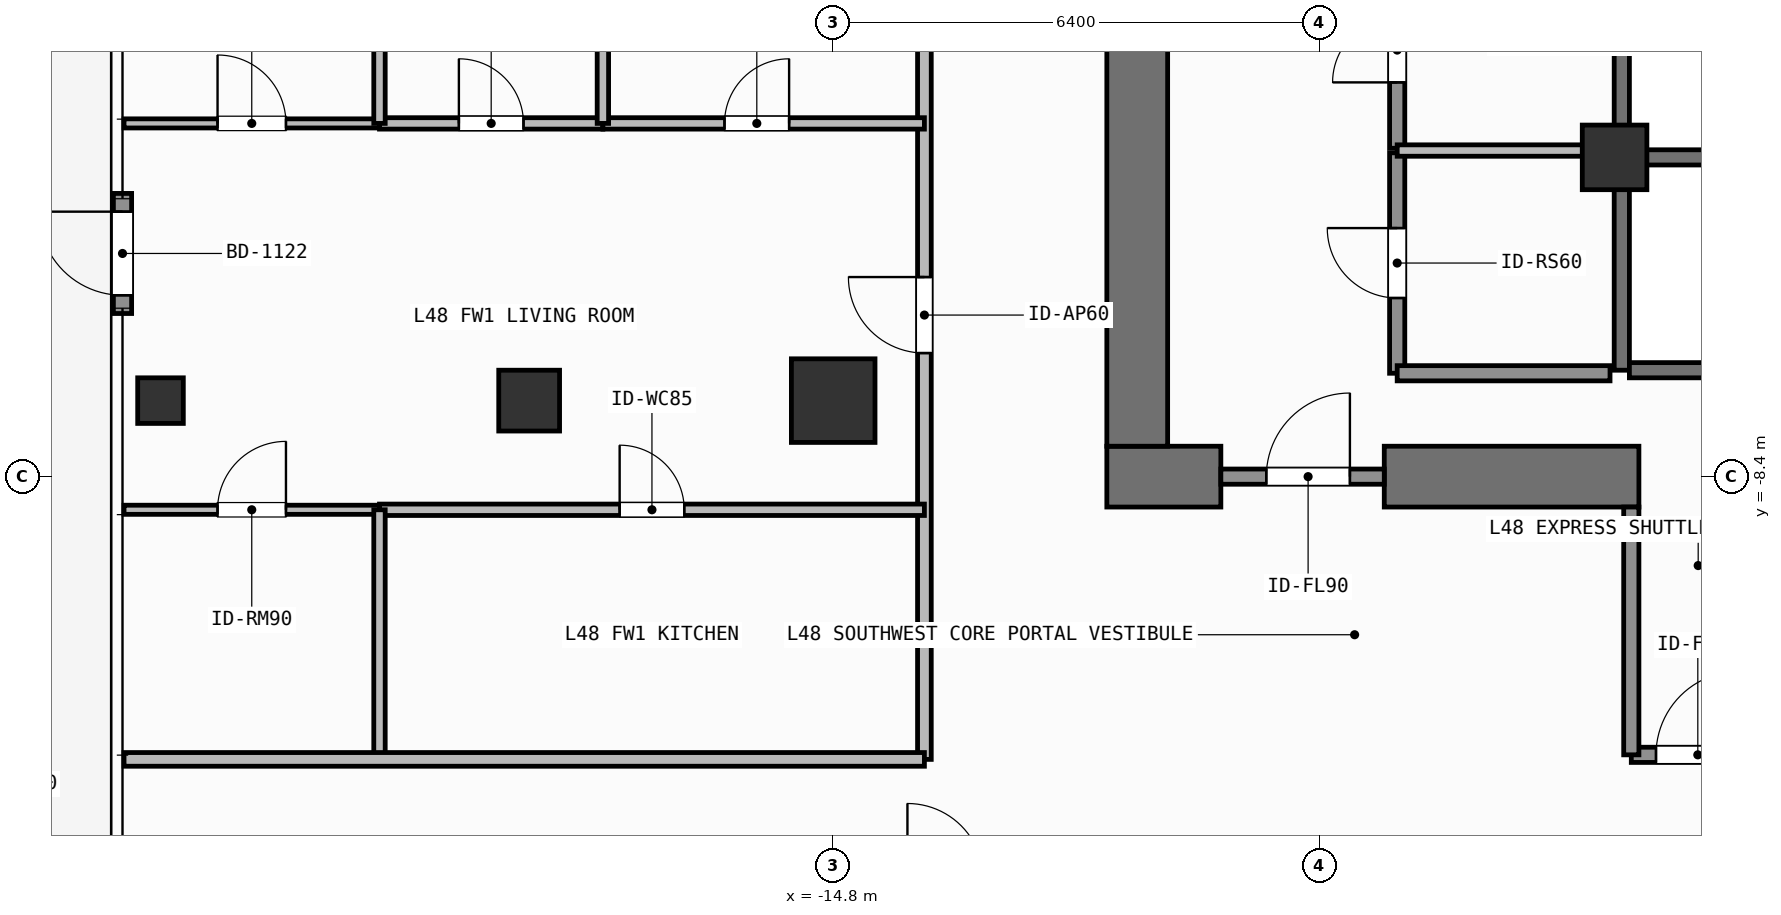
"""IFC4 building model, lengths in metres.
Left out: names, types, materials, properties, quantities, classifications, styles, units other than length and angle.
Written with IfcOpenShell. Run it as: python <this file> out.ifc"""

import sys

from ifc_helpers import new_model, si_unit, direction, frame, frame_2d, origin, origin_2d, place, context, subcontext, project, spatial, rectangle, hollow_rectangle, extrude, element, fill, save


model = new_model("IFC4")
c1 = context("Model", 3, precision=1e-05, world=origin(), true_north=direction((0.0, 1.0)))
c2 = subcontext(c1, "Body", "Model", "MODEL_VIEW")
j1 = project(units=[si_unit("LENGTHUNIT", "METRE"), si_unit("PLANEANGLEUNIT", "RADIAN")], contexts=[c1])
p1 = place(None, origin())
s1 = spatial("IfcSite", under=j1, at=p1, CompositionType="ELEMENT")
p2 = place(p1, origin())
s2 = spatial("IfcBuilding", under=s1, at=p2, CompositionType="ELEMENT")
p3 = place(p2, frame((0.0, 0.0, 195.3)))
s3 = spatial("IfcBuildingStorey", under=s2, at=p3, CompositionType="ELEMENT", Elevation=195.3)
p4 = place(p3, frame((-11.2, -8.4, 0.0), z_axis=(0.0, 0.0, 1.0), x_axis=(1.0, 0.0, 0.0)))
e1 = element("IfcWall", 1, at=p4, inside=s3, PredefinedType="SHEAR", context=c2, shape_type="SweptSolid", body=[
    extrude(rectangle(XDim=1.5, YDim=0.8, at=frame_2d((0.75, 0.0))), origin(), (0.0, 0.0, 1.0), 3.9),
])
p5 = place(p3, frame((-7.55, -8.4, 0.0), z_axis=(0.0, 0.0, 1.0), x_axis=(1.0, 0.0, 0.0)))
e2 = element("IfcWall", 2, at=p5, inside=s3, PredefinedType="SHEAR", context=c2, shape_type="SweptSolid", body=[
    extrude(rectangle(XDim=3.35, YDim=0.8, at=frame_2d((1.675, 0.0))), origin(), (0.0, 0.0, 1.0), 3.9),
])
p6 = place(p3, frame((-10.8, -8.0, 0.0), z_axis=(0.0, 0.0, 1.0), x_axis=(0.0, 1.0, 0.0)))
e3 = element("IfcWall", 3, at=p6, inside=s3, PredefinedType="SHEAR", context=c2, shape_type="SweptSolid", body=[
    extrude(rectangle(XDim=16.0, YDim=0.8, at=frame_2d((8.0, 0.0))), origin(), (0.0, 0.0, 1.0), 3.9),
])
p7 = place(p3, frame((-14.8, -7.4, 0.0), z_axis=(0.0, 0.0, 1.0), x_axis=(1.0, 0.0, 0.0)))
e4 = element("IfcColumn", 4, at=p7, inside=s3, PredefinedType="COLUMN", context=c2, shape_type="SweptSolid", body=[
    extrude(rectangle(XDim=1.1, YDim=1.1, at=origin_2d()), origin(), (0.0, 0.0, 1.0), 3.9),
])
p8 = place(p3, frame((-4.52, -4.2, 0.0), z_axis=(0.0, 0.0, 1.0), x_axis=(1.0, 0.0, 0.0)))
e5 = element("IfcColumn", 5, at=p8, inside=s3, PredefinedType="COLUMN", context=c2, shape_type="SweptSolid", body=[
    extrude(rectangle(XDim=0.85, YDim=0.85, at=origin_2d()), origin(), (0.0, 0.0, 1.0), 3.9),
])
p9 = place(p3, frame((-18.8, -7.4, 0.0), z_axis=(0.0, 0.0, 1.0), x_axis=(1.0, 0.0, 0.0)))
e6 = element("IfcColumn", 6, at=p9, inside=s3, PredefinedType="COLUMN", context=c2, shape_type="SweptSolid", body=[
    extrude(hollow_rectangle(XDim=0.8, YDim=0.8, WallThickness=0.036, at=origin_2d()), origin(), (0.0, 0.0, 1.0), 3.9),
])
p10 = place(p3, frame((-23.65, -7.4, 0.0), z_axis=(0.0, 0.0, 1.0), x_axis=(1.0, 0.0, 0.0)))
e7 = element("IfcColumn", 7, at=p10, inside=s3, PredefinedType="COLUMN", context=c2, shape_type="SweptSolid", body=[
    extrude(hollow_rectangle(XDim=0.6, YDim=0.6, WallThickness=0.028, at=origin_2d()), origin(), (0.0, 0.0, 1.0), 3.9),
])
p11 = place(p3, frame((-24.15, -6.254, 0.0), z_axis=(0.0, 0.0, 1.0), x_axis=(0.0, 1.0, 0.0)))
e8 = element("IfcWall", 8, at=p11, inside=s3, PredefinedType="SOLIDWALL", context=c2, shape_type="SweptSolid", body=[
    extrude(rectangle(XDim=1.58, YDim=0.24, at=frame_2d((0.79, 0.0))), origin(), (0.0, 0.0, 1.0), 3.68),
])
p12 = place(p11, frame((0.24, 0.0, 0.0)))
e9 = element("IfcOpeningElement", 9, at=p12, cuts=e8, PredefinedType="OPENING", context=c2, shape_type="SweptSolid", body=[
    extrude(rectangle(XDim=1.1, YDim=2.2, at=frame_2d((0.55, 1.1))), frame((0.0, 0.13, 0.0), z_axis=(0.0, -1.0, 0.0), x_axis=(1.0, 0.0, 0.0)), (0.0, 0.0, 1.0), 0.26),
])
p13 = place(p3, frame((-4.425, -7.0, 0.0), z_axis=(0.0, 0.0, 1.0), x_axis=(0.0, 1.0, 0.0)))
e10 = element("IfcWall", 10, at=p13, inside=s3, PredefinedType="SHEAR", context=c2, shape_type="SweptSolid", body=[
    extrude(rectangle(XDim=2.8, YDim=0.2, at=frame_2d((1.4, 0.0))), origin(), (0.0, 0.0, 1.0), 3.68),
])
for number, where, z_axis, x_axis in (
    (11, (-4.325, -7.0, 0.0), (0.0, 0.0, 1.0), (1.0, 0.0, 0.0)),
    (12, (-4.325, -4.2, 0.0), (0.0, 0.0, 1.0), (1.0, 0.0, 0.0)),
):
    element("IfcWall", number, at=place(p3, frame(where, z_axis=z_axis, x_axis=x_axis)), inside=s3, PredefinedType="SHEAR", context=c2, shape_type="SweptSolid", body=[
        extrude(rectangle(XDim=2.45, YDim=0.2, at=frame_2d((1.225, 0.0))), origin(), (0.0, 0.0, 1.0), 3.68),
    ])
p14 = place(p3, frame((-4.425, -4.2, 0.0), z_axis=(0.0, 0.0, 1.0), x_axis=(0.0, 1.0, 0.0)))
e13 = element("IfcWall", 13, at=p14, inside=s3, PredefinedType="SHEAR", context=c2, shape_type="SweptSolid", body=[
    extrude(rectangle(XDim=2.8, YDim=0.2, at=frame_2d((1.4, 0.0))), origin(), (0.0, 0.0, 1.0), 3.68),
])
p15 = place(p3, frame((-9.7, -8.4, 0.0), z_axis=(0.0, 0.0, 1.0), x_axis=(1.0, 0.0, 0.0)))
e14 = element("IfcWall", 14, at=p15, inside=s3, PredefinedType="SOLIDWALL", context=c2, shape_type="SweptSolid", body=[
    extrude(rectangle(XDim=2.15, YDim=0.2, at=frame_2d((1.075, 0.0))), origin(), (0.0, 0.0, 1.0), 2.82),
])
p16 = place(p15, frame((0.598, 0.0, 0.0)))
e15 = element("IfcOpeningElement", 15, at=p16, cuts=e14, PredefinedType="OPENING", context=c2, shape_type="SweptSolid", body=[
    extrude(rectangle(XDim=1.1, YDim=2.15, at=frame_2d((0.55, 1.075))), frame((0.0, 0.11, 0.0), z_axis=(0.0, -1.0, 0.0), x_axis=(1.0, 0.0, 0.0)), (0.0, 0.0, 1.0), 0.22),
])
p17 = place(p3, frame((-4.3, -12.06, 0.0), z_axis=(0.0, 0.0, 1.0), x_axis=(1.0, 0.0, 0.0)))
e16 = element("IfcWall", 16, at=p17, inside=s3, PredefinedType="SOLIDWALL", context=c2, shape_type="SweptSolid", body=[
    extrude(rectangle(XDim=1.75, YDim=0.2, at=frame_2d((0.875, 0.0))), origin(), (0.0, 0.0, 1.0), 3.68),
])
p18 = place(p17, frame((0.325, 0.0, 0.0)))
e17 = element("IfcOpeningElement", 17, at=p18, cuts=e16, PredefinedType="OPENING", context=c2, shape_type="SweptSolid", body=[
    extrude(rectangle(XDim=1.1, YDim=2.15, at=frame_2d((0.55, 1.075))), frame((0.0, 0.11, 0.0), z_axis=(0.0, -1.0, 0.0), x_axis=(1.0, 0.0, 0.0)), (0.0, 0.0, 1.0), 0.22),
])
p19 = place(p3, frame((-7.38, -7.04, 0.0), z_axis=(0.0, 0.0, 1.0), x_axis=(0.0, 1.0, 0.0)))
e18 = element("IfcWall", 18, at=p19, inside=s3, PredefinedType="SOLIDWALL", context=c2, shape_type="SweptSolid", body=[
    extrude(rectangle(XDim=2.9, YDim=0.2, at=frame_2d((1.45, 0.0))), origin(), (0.0, 0.0, 1.0), 3.68),
])
p20 = place(p19, frame((0.99, 0.0, 0.0)))
e19 = element("IfcOpeningElement", 19, at=p20, cuts=e18, PredefinedType="OPENING", context=c2, shape_type="SweptSolid", body=[
    extrude(rectangle(XDim=0.92, YDim=2.1, at=frame_2d((0.46, 1.05))), frame((0.0, 0.11, 0.0), z_axis=(0.0, -1.0, 0.0), x_axis=(1.0, 0.0, 0.0)), (0.0, 0.0, 1.0), 0.22),
])
p21 = place(p3, frame((-7.38, -4.08, 0.0), z_axis=(0.0, 0.0, 1.0), x_axis=(0.0, 1.0, 0.0)))
e20 = element("IfcWall", 20, at=p21, inside=s3, PredefinedType="SOLIDWALL", context=c2, shape_type="SweptSolid", body=[
    extrude(rectangle(XDim=2.76, YDim=0.2, at=frame_2d((1.38, 0.0))), origin(), (0.0, 0.0, 1.0), 3.68),
])
p22 = place(p21, frame((0.867, 0.0, 0.0)))
e21 = element("IfcOpeningElement", 21, at=p22, cuts=e20, PredefinedType="OPENING", context=c2, shape_type="SweptSolid", body=[
    extrude(rectangle(XDim=0.85, YDim=2.1, at=frame_2d((0.425, 1.05))), frame((0.0, 0.11, 0.0), z_axis=(0.0, -1.0, 0.0), x_axis=(1.0, 0.0, 0.0)), (0.0, 0.0, 1.0), 0.22),
])
p23 = place(p3, frame((-13.6, -12.12, 0.0), z_axis=(0.0, 0.0, 1.0), x_axis=(0.0, 1.0, 0.0)))
e22 = element("IfcWall", 22, at=p23, inside=s3, PredefinedType="PARTITIONING", context=c2, shape_type="SweptSolid", body=[
    extrude(rectangle(XDim=12.764, YDim=0.18, at=frame_2d((6.382, 0.0))), origin(), (0.0, 0.0, 1.0), 3.68),
])
p24 = place(p23, frame((5.346, 0.0, 0.0)))
e23 = element("IfcOpeningElement", 23, at=p24, cuts=e22, PredefinedType="OPENING", context=c2, shape_type="SweptSolid", body=[
    extrude(rectangle(XDim=1.0, YDim=2.2, at=frame_2d((0.5, 1.1))), frame((0.0, 0.1, 0.0), z_axis=(0.0, -1.0, 0.0), x_axis=(1.0, 0.0, 0.0)), (0.0, 0.0, 1.0), 0.2),
])
p25 = place(p3, frame((-20.769, -3.753, 0.0), z_axis=(0.0, 0.0, 1.0), x_axis=(1.0, 0.0, 0.0)))
e24 = element("IfcWall", 24, at=p25, inside=s3, PredefinedType="PARTITIONING", context=c2, shape_type="SweptSolid", body=[
    extrude(rectangle(XDim=2.939, YDim=0.15, at=frame_2d((1.469, 0.0))), origin(), (0.0, 0.0, 1.0), 3.68),
])
p26 = place(p25, frame((1.044, 0.0, 0.0)))
e25 = element("IfcOpeningElement", 25, at=p26, cuts=e24, PredefinedType="OPENING", context=c2, shape_type="SweptSolid", body=[
    extrude(rectangle(XDim=0.85, YDim=2.1, at=frame_2d((0.425, 1.05))), frame((0.0, 0.085, 0.0), z_axis=(0.0, -1.0, 0.0), x_axis=(1.0, 0.0, 0.0)), (0.0, 0.0, 1.0), 0.17),
])
p27 = place(p3, frame((-17.83, -3.753, 0.0), z_axis=(0.0, 0.0, 1.0), x_axis=(1.0, 0.0, 0.0)))
e26 = element("IfcWall", 26, at=p27, inside=s3, PredefinedType="PARTITIONING", context=c2, shape_type="SweptSolid", body=[
    extrude(rectangle(XDim=4.23, YDim=0.15, at=frame_2d((2.115, 0.0))), origin(), (0.0, 0.0, 1.0), 3.68),
])
p28 = place(p27, frame((1.6, 0.0, 0.0)))
e27 = element("IfcOpeningElement", 27, at=p28, cuts=e26, PredefinedType="OPENING", context=c2, shape_type="SweptSolid", body=[
    extrude(rectangle(XDim=0.85, YDim=2.1, at=frame_2d((0.425, 1.05))), frame((0.0, 0.085, 0.0), z_axis=(0.0, -1.0, 0.0), x_axis=(1.0, 0.0, 0.0)), (0.0, 0.0, 1.0), 0.17),
])
p29 = place(p3, frame((-20.769, -8.836, 0.0), z_axis=(0.0, 0.0, 1.0), x_axis=(1.0, 0.0, 0.0)))
e28 = element("IfcWall", 28, at=p29, inside=s3, PredefinedType="PARTITIONING", context=c2, shape_type="SweptSolid", body=[
    extrude(rectangle(XDim=7.169, YDim=0.15, at=frame_2d((3.584, 0.0))), origin(), (0.0, 0.0, 1.0), 3.68),
])
p30 = place(p29, frame((3.159, 0.0, 0.0)))
e29 = element("IfcOpeningElement", 29, at=p30, cuts=e28, PredefinedType="OPENING", context=c2, shape_type="SweptSolid", body=[
    extrude(rectangle(XDim=0.85, YDim=2.1, at=frame_2d((0.425, 1.05))), frame((0.0, 0.085, 0.0), z_axis=(0.0, -1.0, 0.0), x_axis=(1.0, 0.0, 0.0)), (0.0, 0.0, 1.0), 0.17),
])
p31 = place(p3, frame((-24.13, -8.836, 0.0), z_axis=(0.0, 0.0, 1.0), x_axis=(1.0, 0.0, 0.0)))
e30 = element("IfcWall", 30, at=p31, inside=s3, PredefinedType="PARTITIONING", context=c2, shape_type="SweptSolid", body=[
    extrude(rectangle(XDim=3.361, YDim=0.12, at=frame_2d((1.68, 0.0))), origin(), (0.0, 0.0, 1.0), 3.68),
])
p32 = place(p31, frame((1.23, 0.0, 0.0)))
e31 = element("IfcOpeningElement", 31, at=p32, cuts=e30, PredefinedType="OPENING", context=c2, shape_type="SweptSolid", body=[
    extrude(rectangle(XDim=0.9, YDim=2.1, at=frame_2d((0.45, 1.05))), frame((0.0, 0.07, 0.0), z_axis=(0.0, -1.0, 0.0), x_axis=(1.0, 0.0, 0.0)), (0.0, 0.0, 1.0), 0.14),
])
p33 = place(p3, frame((-24.13, -3.753, 0.0), z_axis=(0.0, 0.0, 1.0), x_axis=(1.0, 0.0, 0.0)))
e32 = element("IfcWall", 32, at=p33, inside=s3, PredefinedType="PARTITIONING", context=c2, shape_type="SweptSolid", body=[
    extrude(rectangle(XDim=3.361, YDim=0.12, at=frame_2d((1.68, 0.0))), origin(), (0.0, 0.0, 1.0), 3.68),
])
p34 = place(p33, frame((1.23, 0.0, 0.0)))
e33 = element("IfcOpeningElement", 33, at=p34, cuts=e32, PredefinedType="OPENING", context=c2, shape_type="SweptSolid", body=[
    extrude(rectangle(XDim=0.9, YDim=2.1, at=frame_2d((0.45, 1.05))), frame((0.0, 0.07, 0.0), z_axis=(0.0, -1.0, 0.0), x_axis=(1.0, 0.0, 0.0)), (0.0, 0.0, 1.0), 0.14),
])
p35 = place(p3, frame((-4.3, -12.06, 0.0), z_axis=(0.0, 0.0, 1.0), x_axis=(0.0, 1.0, 0.0)))
e34 = element("IfcWall", 34, at=p35, inside=s3, PredefinedType="SOLIDWALL", context=c2, shape_type="SweptSolid", body=[
    extrude(rectangle(XDim=3.26, YDim=0.2, at=frame_2d((1.63, 0.0))), origin(), (0.0, 0.0, 1.0), 3.68),
])
p36 = place(p3, frame((-7.38, -7.04, 0.0), z_axis=(0.0, 0.0, 1.0), x_axis=(1.0, 0.0, 0.0)))
e35 = element("IfcWall", 35, at=p36, inside=s3, PredefinedType="SOLIDWALL", context=c2, shape_type="SweptSolid", body=[
    extrude(rectangle(XDim=2.8, YDim=0.2, at=frame_2d((1.4, 0.0))), origin(), (0.0, 0.0, 1.0), 3.68),
])
p37 = place(p3, frame((-7.38, -4.11, 0.0), z_axis=(0.0, 0.0, 1.0), x_axis=(1.0, 0.0, 0.0)))
e36 = element("IfcWall", 36, at=p37, inside=s3, PredefinedType="PARTITIONING", context=c2, shape_type="SweptSolid", body=[
    extrude(rectangle(XDim=2.8, YDim=0.15, at=frame_2d((1.4, 0.0))), origin(), (0.0, 0.0, 1.0), 3.68),
])
p38 = place(p3, frame((-17.83, -3.753, 0.0), z_axis=(0.0, 0.0, 1.0), x_axis=(0.0, 1.0, 0.0)))
e37 = element("IfcWall", 37, at=p38, inside=s3, PredefinedType="PARTITIONING", context=c2, shape_type="SweptSolid", body=[
    extrude(rectangle(XDim=4.397, YDim=0.15, at=frame_2d((2.198, 0.0))), origin(), (0.0, 0.0, 1.0), 3.68),
])
p39 = place(p3, frame((-20.769, -12.12, 0.0), z_axis=(0.0, 0.0, 1.0), x_axis=(0.0, 1.0, 0.0)))
e38 = element("IfcWall", 38, at=p39, inside=s3, PredefinedType="PARTITIONING", context=c2, shape_type="SweptSolid", body=[
    extrude(rectangle(XDim=3.284, YDim=0.15, at=frame_2d((1.642, 0.0))), origin(), (0.0, 0.0, 1.0), 3.68),
])
p40 = place(p3, frame((-20.769, -3.753, 0.0), z_axis=(0.0, 0.0, 1.0), x_axis=(0.0, 1.0, 0.0)))
e39 = element("IfcWall", 39, at=p40, inside=s3, PredefinedType="PARTITIONING", context=c2, shape_type="SweptSolid", body=[
    extrude(rectangle(XDim=4.397, YDim=0.15, at=frame_2d((2.198, 0.0))), origin(), (0.0, 0.0, 1.0), 3.68),
])
p41 = place(p3, frame((-24.13, -12.12, 0.0), z_axis=(0.0, 0.0, 1.0), x_axis=(1.0, 0.0, 0.0)))
e40 = element("IfcWall", 40, at=p41, inside=s3, PredefinedType="PARTITIONING", context=c2, shape_type="SweptSolid", body=[
    extrude(rectangle(XDim=10.53, YDim=0.18, at=frame_2d((5.265, 0.0))), origin(), (0.0, 0.0, 1.0), 3.68),
])
p42 = place(p12, origin())
e41 = element("IfcDoor", 41, at=p42, inside=s3, OperationType="SINGLE_SWING_RIGHT", PredefinedType="DOOR", context=c2, shape_type="SweptSolid", body=[
    extrude(rectangle(XDim=1.1, YDim=2.2, at=frame_2d((0.55, 1.1))), frame((0.0, 0.025, 0.0), z_axis=(0.0, -1.0, 0.0), x_axis=(1.0, 0.0, 0.0)), (0.0, 0.0, 1.0), 0.05),
])
fill(e9, e41)
p43 = place(p16, origin())
e42 = element("IfcDoor", 42, at=p43, inside=s3, OperationType="SINGLE_SWING_RIGHT", PredefinedType="DOOR", context=c2, shape_type="SweptSolid", body=[
    extrude(rectangle(XDim=1.1, YDim=2.15, at=frame_2d((0.55, 1.075))), frame((0.0, 0.025, 0.0), z_axis=(0.0, -1.0, 0.0), x_axis=(1.0, 0.0, 0.0)), (0.0, 0.0, 1.0), 0.05),
])
fill(e15, e42)
p44 = place(p18, origin())
e43 = element("IfcDoor", 43, at=p44, inside=s3, OperationType="SINGLE_SWING_RIGHT", PredefinedType="DOOR", context=c2, shape_type="SweptSolid", body=[
    extrude(rectangle(XDim=1.1, YDim=2.15, at=frame_2d((0.55, 1.075))), frame((0.0, 0.025, 0.0), z_axis=(0.0, -1.0, 0.0), x_axis=(1.0, 0.0, 0.0)), (0.0, 0.0, 1.0), 0.05),
])
fill(e17, e43)
p45 = place(p20, origin())
e44 = element("IfcDoor", 44, at=p45, inside=s3, OperationType="SINGLE_SWING_RIGHT", PredefinedType="DOOR", context=c2, shape_type="SweptSolid", body=[
    extrude(rectangle(XDim=0.92, YDim=2.1, at=frame_2d((0.46, 1.05))), frame((0.0, 0.025, 0.0), z_axis=(0.0, -1.0, 0.0), x_axis=(1.0, 0.0, 0.0)), (0.0, 0.0, 1.0), 0.05),
])
fill(e19, e44)
p46 = place(p22, origin())
e45 = element("IfcDoor", 45, at=p46, inside=s3, OperationType="SINGLE_SWING_LEFT", PredefinedType="DOOR", context=c2, shape_type="SweptSolid", body=[
    extrude(rectangle(XDim=0.85, YDim=2.1, at=frame_2d((0.425, 1.05))), frame((0.0, 0.025, 0.0), z_axis=(0.0, -1.0, 0.0), x_axis=(1.0, 0.0, 0.0)), (0.0, 0.0, 1.0), 0.05),
])
fill(e21, e45)
p47 = place(p24, origin())
e46 = element("IfcDoor", 46, at=p47, inside=s3, OperationType="SINGLE_SWING_RIGHT", PredefinedType="DOOR", context=c2, shape_type="SweptSolid", body=[
    extrude(rectangle(XDim=1.0, YDim=2.2, at=frame_2d((0.5, 1.1))), frame((0.0, 0.025, 0.0), z_axis=(0.0, -1.0, 0.0), x_axis=(1.0, 0.0, 0.0)), (0.0, 0.0, 1.0), 0.05),
])
fill(e23, e46)
p48 = place(p26, origin())
e47 = element("IfcDoor", 47, at=p48, inside=s3, OperationType="SINGLE_SWING_LEFT", PredefinedType="DOOR", context=c2, shape_type="SweptSolid", body=[
    extrude(rectangle(XDim=0.85, YDim=2.1, at=frame_2d((0.425, 1.05))), frame((0.0, 0.025, 0.0), z_axis=(0.0, -1.0, 0.0), x_axis=(1.0, 0.0, 0.0)), (0.0, 0.0, 1.0), 0.05),
])
fill(e25, e47)
p49 = place(p28, origin())
e48 = element("IfcDoor", 48, at=p49, inside=s3, OperationType="SINGLE_SWING_RIGHT", PredefinedType="DOOR", context=c2, shape_type="SweptSolid", body=[
    extrude(rectangle(XDim=0.85, YDim=2.1, at=frame_2d((0.425, 1.05))), frame((0.0, 0.025, 0.0), z_axis=(0.0, -1.0, 0.0), x_axis=(1.0, 0.0, 0.0)), (0.0, 0.0, 1.0), 0.05),
])
fill(e27, e48)
p50 = place(p30, origin())
e49 = element("IfcDoor", 49, at=p50, inside=s3, OperationType="SINGLE_SWING_LEFT", PredefinedType="DOOR", context=c2, shape_type="SweptSolid", body=[
    extrude(rectangle(XDim=0.85, YDim=2.1, at=frame_2d((0.425, 1.05))), frame((0.0, 0.025, 0.0), z_axis=(0.0, -1.0, 0.0), x_axis=(1.0, 0.0, 0.0)), (0.0, 0.0, 1.0), 0.05),
])
fill(e29, e49)
p51 = place(p32, origin())
e50 = element("IfcDoor", 50, at=p51, inside=s3, OperationType="SINGLE_SWING_RIGHT", PredefinedType="DOOR", context=c2, shape_type="SweptSolid", body=[
    extrude(rectangle(XDim=0.9, YDim=2.1, at=frame_2d((0.45, 1.05))), frame((0.0, 0.025, 0.0), z_axis=(0.0, -1.0, 0.0), x_axis=(1.0, 0.0, 0.0)), (0.0, 0.0, 1.0), 0.05),
])
fill(e31, e50)
p52 = place(p34, origin())
e51 = element("IfcDoor", 51, at=p52, inside=s3, OperationType="SINGLE_SWING_LEFT", PredefinedType="DOOR", context=c2, shape_type="SweptSolid", body=[
    extrude(rectangle(XDim=0.9, YDim=2.1, at=frame_2d((0.45, 1.05))), frame((0.0, 0.025, 0.0), z_axis=(0.0, -1.0, 0.0), x_axis=(1.0, 0.0, 0.0)), (0.0, 0.0, 1.0), 0.05),
])
fill(e33, e51)
save(model, sys.argv[1])
